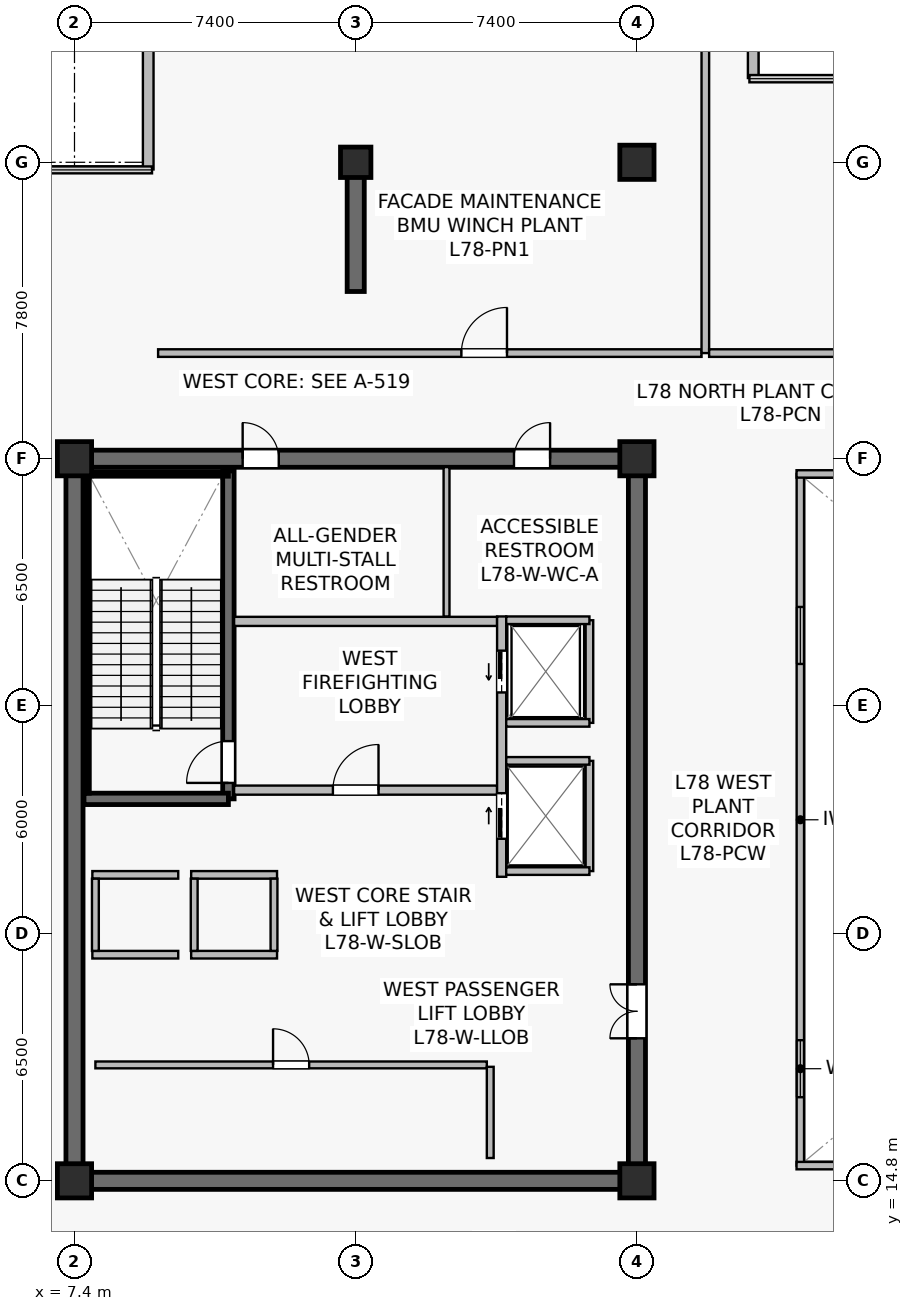
"""IFC4 building model, lengths in metres.
Left out: names, types, materials, properties, quantities, classifications, styles, units other than length and angle.
Written with IfcOpenShell. Run it as: python <this file> out.ifc"""

import sys

from ifc_helpers import new_model, si_unit, direction, frame, frame_2d, origin, origin_2d, place, context, subcontext, project, spatial, rectangle, extrude, source, transform, mapped, element, fill, save


model = new_model("IFC4")
c1 = context("Model", 3, precision=1e-05, world=origin(), true_north=direction((0.0, 1.0)))
c2 = subcontext(c1, "Body", "Model", "MODEL_VIEW")
j1 = project(units=[si_unit("LENGTHUNIT", "METRE"), si_unit("PLANEANGLEUNIT", "RADIAN")], contexts=[c1])
p1 = place(None, origin())
s1 = spatial("IfcSite", under=j1, at=p1, CompositionType="ELEMENT")
p2 = place(p1, origin())
s2 = spatial("IfcBuilding", under=s1, at=p2, CompositionType="ELEMENT")
p3 = place(p2, frame((0.0, 0.0, 327.0)))
s3 = spatial("IfcBuildingStorey", under=s2, at=p3, CompositionType="ELEMENT", Elevation=327.0)
p4 = place(p3, frame((7.175, 14.8, 0.0), z_axis=(0.0, 0.0, 1.0), x_axis=(1.0, 0.0, 0.0)))
e1 = element("IfcWall", 1, at=p4, inside=s3, PredefinedType="SHEAR", context=c2, shape_type="SweptSolid", body=[
    extrude(rectangle(XDim=15.25, YDim=0.45, at=frame_2d((7.625, 0.0))), origin(), (0.0, 0.0, 1.0), 5.12),
])
p5 = place(p3, frame((7.175, 33.8, 0.0), z_axis=(0.0, 0.0, 1.0), x_axis=(1.0, 0.0, 0.0)))
e2 = element("IfcWall", 2, at=p5, inside=s3, PredefinedType="SHEAR", context=c2, shape_type="SweptSolid", body=[
    extrude(rectangle(XDim=15.25, YDim=0.45, at=frame_2d((7.625, 0.0))), origin(), (0.0, 0.0, 1.0), 5.12),
])
p6 = place(p5, frame((4.65, 0.0, 0.0)))
e3 = element("IfcOpeningElement", 3, at=p6, cuts=e2, PredefinedType="OPENING", context=c2, shape_type="SweptSolid", body=[
    extrude(rectangle(XDim=0.95, YDim=2.15, at=frame_2d((0.475, 1.075))), frame((0.0, 0.235, 0.0), z_axis=(0.0, -1.0, 0.0), x_axis=(1.0, 0.0, 0.0)), (0.0, 0.0, 1.0), 0.47),
])
p7 = place(p5, frame((11.79, 0.0, 0.0)))
e4 = element("IfcOpeningElement", 4, at=p7, cuts=e2, PredefinedType="OPENING", context=c2, shape_type="SweptSolid", body=[
    extrude(rectangle(XDim=0.95, YDim=2.15, at=frame_2d((0.475, 1.075))), frame((0.0, 0.235, 0.0), z_axis=(0.0, -1.0, 0.0), x_axis=(1.0, 0.0, 0.0)), (0.0, 0.0, 1.0), 0.47),
])
p8 = place(p3, frame((7.4, 15.025, 0.0), z_axis=(0.0, 0.0, 1.0), x_axis=(0.0, 1.0, 0.0)))
e5 = element("IfcWall", 5, at=p8, inside=s3, PredefinedType="SHEAR", context=c2, shape_type="SweptSolid", body=[
    extrude(rectangle(XDim=18.55, YDim=0.45, at=frame_2d((9.275, 0.0))), origin(), (0.0, 0.0, 1.0), 5.12),
])
p9 = place(p3, frame((22.2, 15.025, 0.0), z_axis=(0.0, 0.0, 1.0), x_axis=(0.0, 1.0, 0.0)))
e6 = element("IfcWall", 6, at=p9, inside=s3, PredefinedType="SHEAR", context=c2, shape_type="SweptSolid", body=[
    extrude(rectangle(XDim=18.55, YDim=0.45, at=frame_2d((9.275, 0.0))), origin(), (0.0, 0.0, 1.0), 5.12),
])
p10 = place(p9, frame((3.525, 0.0, 0.0)))
e7 = element("IfcOpeningElement", 7, at=p10, cuts=e6, PredefinedType="OPENING", context=c2, shape_type="SweptSolid", body=[
    extrude(rectangle(XDim=1.42, YDim=2.2, at=frame_2d((0.71, 1.1))), frame((0.0, 0.235, 0.0), z_axis=(0.0, -1.0, 0.0), x_axis=(1.0, 0.0, 0.0)), (0.0, 0.0, 1.0), 0.47),
])
p11 = place(p3, frame((11.45, 24.85, 0.0), z_axis=(0.0, 0.0, 1.0), x_axis=(0.0, 1.0, 0.0)))
e8 = element("IfcWall", 8, at=p11, inside=s3, PredefinedType="SHEAR", context=c2, shape_type="SweptSolid", body=[
    extrude(rectangle(XDim=8.63, YDim=0.3, at=frame_2d((4.315, 0.0))), origin(), (0.0, 0.0, 1.0), 5.12),
])
p12 = place(p11, frame((0.42, 0.0, 0.0)))
e9 = element("IfcOpeningElement", 9, at=p12, cuts=e8, PredefinedType="OPENING", context=c2, shape_type="SweptSolid", body=[
    extrude(rectangle(XDim=1.1, YDim=2.15, at=frame_2d((0.55, 1.075))), frame((0.0, 0.16, 0.0), z_axis=(0.0, -1.0, 0.0), x_axis=(1.0, 0.0, 0.0)), (0.0, 0.0, 1.0), 0.32),
])
p13 = place(p3, frame((7.65, 24.85, 0.0), z_axis=(0.0, 0.0, 1.0), x_axis=(1.0, 0.0, 0.0)))
e10 = element("IfcWall", 10, at=p13, inside=s3, PredefinedType="SHEAR", context=c2, shape_type="SweptSolid", body=[
    extrude(rectangle(XDim=3.8, YDim=0.3, at=frame_2d((1.9, 0.0))), origin(), (0.0, 0.0, 1.0), 5.12),
])
p14 = place(p3, frame((7.73, 33.4, 0.0), z_axis=(0.0, 0.0, 1.0), x_axis=(1.0, 0.0, 0.0)))
e11 = element("IfcWall", 11, at=p14, inside=s3, PredefinedType="SOLIDWALL", context=c2, shape_type="SweptSolid", body=[
    extrude(rectangle(XDim=3.72, YDim=0.12, at=frame_2d((1.86, 0.0))), origin(), (0.0, 0.0, 1.0), 5.12),
])
p15 = place(p3, frame((7.73, 25.0, 0.0), z_axis=(0.0, 0.0, 1.0), x_axis=(0.0, 1.0, 0.0)))
e12 = element("IfcWall", 12, at=p15, inside=s3, PredefinedType="SOLIDWALL", context=c2, shape_type="SweptSolid", body=[
    extrude(rectangle(XDim=8.32, YDim=0.12, at=frame_2d((4.16, 0.0))), origin(), (0.0, 0.0, 1.0), 5.12),
])
p16 = place(p3, frame((14.8, 38.2, 0.0), z_axis=(0.0, 0.0, 1.0), x_axis=(0.0, 1.0, 0.0)))
e13 = element("IfcWall", 13, at=p16, inside=s3, PredefinedType="SHEAR", context=c2, shape_type="SweptSolid", body=[
    extrude(rectangle(XDim=3.1, YDim=0.45, at=frame_2d((1.55, 0.0))), origin(), (0.0, 0.0, 1.0), 5.12),
])
m1 = source(origin(), c2, "Body", "SweptSolid", [
    extrude(rectangle(XDim=0.9, YDim=0.9, at=origin_2d()), origin(), (0.0, 0.0, 1.0), 5.4),
])
for number, where, z_axis, x_axis in (
    (14, (7.4, 14.8, 0.0), (0.0, 0.0, 1.0), (1.0, 0.0, 0.0)),
    (15, (22.2, 14.8, 0.0), (0.0, 0.0, 1.0), (1.0, 0.0, 0.0)),
    (16, (7.4, 33.8, 0.0), (0.0, 0.0, 1.0), (1.0, 0.0, 0.0)),
    (17, (22.2, 33.8, 0.0), (0.0, 0.0, 1.0), (1.0, 0.0, 0.0)),
):
    element("IfcColumn", number, at=place(p3, frame(where, z_axis=z_axis, x_axis=x_axis)), inside=s3, PredefinedType="COLUMN", context=c2, shape_type="MappedRepresentation", body=[
        mapped(m1, transform((0.0, 0.0, 0.0), scale=1.0)),
    ])
m2 = source(origin(), c2, "Body", "SweptSolid", [
    extrude(rectangle(XDim=0.8, YDim=0.8, at=origin_2d()), origin(), (0.0, 0.0, 1.0), 5.4),
])
p17 = place(p3, frame((14.8, 41.6, 0.0), z_axis=(0.0, 0.0, 1.0), x_axis=(1.0, 0.0, 0.0)))
e18 = element("IfcColumn", 18, at=p17, inside=s3, PredefinedType="COLUMN", context=c2, shape_type="MappedRepresentation", body=[
    mapped(m2, transform((0.0, 0.0, 0.0), scale=1.0)),
])
p18 = place(p3, frame((22.2, 41.6, 0.0), z_axis=(0.0, 0.0, 1.0), x_axis=(1.0, 0.0, 0.0)))
e19 = element("IfcColumn", 19, at=p18, inside=s3, PredefinedType="COLUMN", context=c2, shape_type="MappedRepresentation", body=[
    mapped(m1, transform((0.0, 0.0, 0.0), scale=1.0)),
])
p19 = place(p3, frame((25.26, 43.817, 0.0), z_axis=(0.0, 0.0, 1.0), x_axis=(0.0, 1.0, 0.0)))
e20 = element("IfcWall", 20, at=p19, inside=s3, PredefinedType="STANDARD", context=c2, shape_type="SweptSolid", body=[
    extrude(rectangle(XDim=1.083, YDim=0.28, at=frame_2d((0.542, 0.0))), origin(), (0.0, 0.0, 1.0), 5.12),
])
p20 = place(p3, frame((9.34, 44.9, 0.0), z_axis=(0.0, 0.0, 1.0), x_axis=(0.0, -1.0, 0.0)))
e21 = element("IfcWall", 21, at=p20, inside=s3, PredefinedType="STANDARD", context=c2, shape_type="SweptSolid", body=[
    extrude(rectangle(XDim=3.488, YDim=0.28, at=frame_2d((1.744, 0.0))), origin(), (0.0, 0.0, 1.0), 5.12),
])
p21 = place(p3, frame((11.6, 25.08, 0.0), z_axis=(0.0, 0.0, 1.0), x_axis=(1.0, 0.0, 0.0)))
e22 = element("IfcWall", 22, at=p21, inside=s3, PredefinedType="SOLIDWALL", context=c2, shape_type="SweptSolid", body=[
    extrude(rectangle(XDim=6.92, YDim=0.24, at=frame_2d((3.46, 0.0))), origin(), (0.0, 0.0, 1.0), 4.517),
])
p22 = place(p21, frame((2.6, 0.0, 0.0)))
e23 = element("IfcOpeningElement", 23, at=p22, cuts=e22, PredefinedType="OPENING", context=c2, shape_type="SweptSolid", body=[
    extrude(rectangle(XDim=1.2, YDim=2.16, at=frame_2d((0.6, 1.08))), frame((0.0, 0.13, 0.0), z_axis=(0.0, -1.0, 0.0), x_axis=(1.0, 0.0, 0.0)), (0.0, 0.0, 1.0), 0.26),
])
p23 = place(p3, frame((11.6, 29.52, 0.0), z_axis=(0.0, 0.0, 1.0), x_axis=(1.0, 0.0, 0.0)))
e24 = element("IfcWall", 24, at=p23, inside=s3, PredefinedType="SOLIDWALL", context=c2, shape_type="SweptSolid", body=[
    extrude(rectangle(XDim=6.92, YDim=0.24, at=frame_2d((3.46, 0.0))), origin(), (0.0, 0.0, 1.0), 4.517),
])
p24 = place(p3, frame((18.64, 22.8, 0.0), z_axis=(0.0, 0.0, 1.0), x_axis=(0.0, 1.0, 0.0)))
e25 = element("IfcWall", 25, at=p24, inside=s3, PredefinedType="SOLIDWALL", context=c2, shape_type="SweptSolid", body=[
    extrude(rectangle(XDim=6.85, YDim=0.24, at=frame_2d((3.425, 0.0))), origin(), (0.0, 0.0, 1.0), 4.255),
])
p25 = place(p24, frame((4.85, 0.0, 0.0)))
e26 = element("IfcOpeningElement", 26, at=p25, cuts=e25, PredefinedType="OPENING", context=c2, shape_type="SweptSolid", body=[
    extrude(rectangle(XDim=1.1, YDim=2.22, at=frame_2d((0.55, 1.11))), frame((0.0, 0.13, 0.0), z_axis=(0.0, -1.0, 0.0), x_axis=(1.0, 0.0, 0.0)), (0.0, 0.0, 1.0), 0.26),
])
p26 = place(p24, frame((1.0, 0.0, 0.0)))
e27 = element("IfcOpeningElement", 27, at=p26, cuts=e25, PredefinedType="OPENING", context=c2, shape_type="SweptSolid", body=[
    extrude(rectangle(XDim=1.2, YDim=2.22, at=frame_2d((0.6, 1.11))), frame((0.0, 0.13, 0.0), z_axis=(0.0, -1.0, 0.0), x_axis=(1.0, 0.0, 0.0)), (0.0, 0.0, 1.0), 0.26),
])
for number, where, z_axis, x_axis in (
    (28, (7.87, 20.75, 0.0), (0.0, 0.0, 1.0), (1.0, 0.0, 0.0)),
    (29, (7.87, 22.85, 0.0), (0.0, 0.0, 1.0), (1.0, 0.0, 0.0)),
):
    element("IfcWall", number, at=place(p3, frame(where, z_axis=z_axis, x_axis=x_axis)), inside=s3, PredefinedType="SOLIDWALL", context=c2, shape_type="SweptSolid", body=[
        extrude(rectangle(XDim=2.26, YDim=0.2, at=frame_2d((1.13, 0.0))), origin(), (0.0, 0.0, 1.0), 5.12),
    ])
p27 = place(p3, frame((7.95, 20.85, 0.0), z_axis=(0.0, 0.0, 1.0), x_axis=(0.0, 1.0, 0.0)))
e30 = element("IfcWall", 30, at=p27, inside=s3, PredefinedType="SOLIDWALL", context=c2, shape_type="SweptSolid", body=[
    extrude(rectangle(XDim=1.9, YDim=0.18, at=frame_2d((0.95, 0.0))), origin(), (0.0, 0.0, 1.0), 5.12),
])
for number, where, z_axis, x_axis in (
    (31, (10.47, 20.75, 0.0), (0.0, 0.0, 1.0), (1.0, 0.0, 0.0)),
    (32, (10.47, 22.85, 0.0), (0.0, 0.0, 1.0), (1.0, 0.0, 0.0)),
):
    element("IfcWall", number, at=place(p3, frame(where, z_axis=z_axis, x_axis=x_axis)), inside=s3, PredefinedType="SOLIDWALL", context=c2, shape_type="SweptSolid", body=[
        extrude(rectangle(XDim=2.26, YDim=0.2, at=frame_2d((1.13, 0.0))), origin(), (0.0, 0.0, 1.0), 5.12),
    ])
for number, where, z_axis, x_axis in (
    (33, (10.55, 20.85, 0.0), (0.0, 0.0, 1.0), (0.0, 1.0, 0.0)),
    (34, (12.65, 20.85, 0.0), (0.0, 0.0, 1.0), (0.0, 1.0, 0.0)),
):
    element("IfcWall", number, at=place(p3, frame(where, z_axis=z_axis, x_axis=x_axis)), inside=s3, PredefinedType="SOLIDWALL", context=c2, shape_type="SweptSolid", body=[
        extrude(rectangle(XDim=1.9, YDim=0.18, at=frame_2d((0.95, 0.0))), origin(), (0.0, 0.0, 1.0), 5.12),
    ])
p28 = place(p3, frame((20.95, 26.85, 0.0), z_axis=(0.0, 0.0, 1.0), x_axis=(0.0, 1.0, 0.0)))
e35 = element("IfcWall", 35, at=p28, inside=s3, PredefinedType="SOLIDWALL", context=c2, shape_type="SweptSolid", body=[
    extrude(rectangle(XDim=2.7, YDim=0.2, at=frame_2d((1.35, 0.0))), origin(), (0.0, 0.0, 1.0), 5.12),
])
p29 = place(p3, frame((18.76, 29.55, 0.0), z_axis=(0.0, 0.0, 1.0), x_axis=(1.0, 0.0, 0.0)))
e36 = element("IfcWall", 36, at=p29, inside=s3, PredefinedType="SOLIDWALL", context=c2, shape_type="SweptSolid", body=[
    extrude(rectangle(XDim=2.19, YDim=0.2, at=frame_2d((1.095, 0.0))), origin(), (0.0, 0.0, 1.0), 5.12),
])
p30 = place(p3, frame((18.76, 26.85, 0.0), z_axis=(0.0, 0.0, 1.0), x_axis=(1.0, 0.0, 0.0)))
e37 = element("IfcWall", 37, at=p30, inside=s3, PredefinedType="SOLIDWALL", context=c2, shape_type="SweptSolid", body=[
    extrude(rectangle(XDim=2.19, YDim=0.2, at=frame_2d((1.095, 0.0))), origin(), (0.0, 0.0, 1.0), 4.517),
])
p31 = place(p3, frame((20.95, 22.95, 0.0), z_axis=(0.0, 0.0, 1.0), x_axis=(0.0, 1.0, 0.0)))
e38 = element("IfcWall", 38, at=p31, inside=s3, PredefinedType="SOLIDWALL", context=c2, shape_type="SweptSolid", body=[
    extrude(rectangle(XDim=2.9, YDim=0.2, at=frame_2d((1.45, 0.0))), origin(), (0.0, 0.0, 1.0), 4.255),
])
for number, where, z_axis, x_axis in (
    (39, (18.76, 25.85, 0.0), (0.0, 0.0, 1.0), (1.0, 0.0, 0.0)),
    (40, (18.76, 22.95, 0.0), (0.0, 0.0, 1.0), (1.0, 0.0, 0.0)),
):
    element("IfcWall", number, at=place(p3, frame(where, z_axis=z_axis, x_axis=x_axis)), inside=s3, PredefinedType="SOLIDWALL", context=c2, shape_type="SweptSolid", body=[
        extrude(rectangle(XDim=2.19, YDim=0.2, at=frame_2d((1.095, 0.0))), origin(), (0.0, 0.0, 1.0), 5.12),
    ])
p32 = place(p3, frame((7.95, 17.85, 0.0), z_axis=(0.0, 0.0, 1.0), x_axis=(1.0, 0.0, 0.0)))
e41 = element("IfcWall", 41, at=p32, inside=s3, PredefinedType="SOLIDWALL", context=c2, shape_type="SweptSolid", body=[
    extrude(rectangle(XDim=10.3, YDim=0.18, at=frame_2d((5.15, 0.0))), origin(), (0.0, 0.0, 1.0), 4.517),
])
p33 = place(p32, frame((4.675, 0.0, 0.0)))
e42 = element("IfcOpeningElement", 42, at=p33, cuts=e41, PredefinedType="OPENING", context=c2, shape_type="SweptSolid", body=[
    extrude(rectangle(XDim=0.95, YDim=2.15, at=frame_2d((0.475, 1.075))), frame((0.0, 0.1, 0.0), z_axis=(0.0, -1.0, 0.0), x_axis=(1.0, 0.0, 0.0)), (0.0, 0.0, 1.0), 0.2),
])
p34 = place(p3, frame((18.34, 15.4, 0.0), z_axis=(0.0, 0.0, 1.0), x_axis=(0.0, 1.0, 0.0)))
e43 = element("IfcWall", 43, at=p34, inside=s3, PredefinedType="SOLIDWALL", context=c2, shape_type="SweptSolid", body=[
    extrude(rectangle(XDim=2.4, YDim=0.18, at=frame_2d((1.2, 0.0))), origin(), (0.0, 0.0, 1.0), 5.12),
])
p35 = place(p3, frame((17.19, 29.65, 0.0), z_axis=(0.0, 0.0, 1.0), x_axis=(0.0, 1.0, 0.0)))
e44 = element("IfcWall", 44, at=p35, inside=s3, PredefinedType="PLUMBINGWALL", context=c2, shape_type="SweptSolid", body=[
    extrude(rectangle(XDim=3.93, YDim=0.155, at=frame_2d((1.965, 0.0))), origin(), (0.0, 0.0, 1.0), 5.12),
])
p36 = place(p3, frame((26.5, 15.2, 0.0), z_axis=(0.0, 0.0, 1.0), x_axis=(0.0, 1.0, 0.0)))
e45 = element("IfcWall", 45, at=p36, inside=s3, PredefinedType="SOLIDWALL", context=c2, shape_type="SweptSolid", body=[
    extrude(rectangle(XDim=18.2, YDim=0.195, at=frame_2d((9.1, 0.0))), origin(), (0.0, 0.0, 1.0), 5.12),
])
p37 = place(p36, frame((1.8, 0.0, 0.9)))
e46 = element("IfcOpeningElement", 46, at=p37, cuts=e45, PredefinedType="OPENING", context=c2, shape_type="SweptSolid", body=[
    extrude(rectangle(XDim=1.5, YDim=1.4, at=frame_2d((0.75, 0.7))), frame((0.0, 0.107, 0.0), z_axis=(0.0, -1.0, 0.0), x_axis=(1.0, 0.0, 0.0)), (0.0, 0.0, 1.0), 0.215),
])
p38 = place(p36, frame((13.2, 0.0, 0.9)))
e47 = element("IfcOpeningElement", 47, at=p38, cuts=e45, PredefinedType="OPENING", context=c2, shape_type="SweptSolid", body=[
    extrude(rectangle(XDim=1.5, YDim=1.4, at=frame_2d((0.75, 0.7))), frame((0.0, 0.107, 0.0), z_axis=(0.0, -1.0, 0.0), x_axis=(1.0, 0.0, 0.0)), (0.0, 0.0, 1.0), 0.215),
])
for number, where, z_axis, x_axis in (
    (48, (26.4, 15.2, 0.0), (0.0, 0.0, 1.0), (1.0, 0.0, 0.0)),
    (49, (26.4, 33.4, 0.0), (0.0, 0.0, 1.0), (1.0, 0.0, 0.0)),
):
    element("IfcWall", number, at=place(p3, frame(where, z_axis=z_axis, x_axis=x_axis)), inside=s3, PredefinedType="SOLIDWALL", context=c2, shape_type="SweptSolid", body=[
        extrude(rectangle(XDim=22.0, YDim=0.195, at=frame_2d((11.0, 0.0))), origin(), (0.0, 0.0, 1.0), 5.12),
    ])
p39 = place(p3, frame((9.6, 36.58, 0.0), z_axis=(0.0, 0.0, 1.0), x_axis=(1.0, 0.0, 0.0)))
e50 = element("IfcWall", 50, at=p39, inside=s3, PredefinedType="SOLIDWALL", context=c2, shape_type="SweptSolid", body=[
    extrude(rectangle(XDim=14.3, YDim=0.2, at=frame_2d((7.15, 0.0))), origin(), (0.0, 0.0, 1.0), 4.517),
])
p40 = place(p39, frame((7.981, 0.0, 0.0)))
e51 = element("IfcOpeningElement", 51, at=p40, cuts=e50, PredefinedType="OPENING", context=c2, shape_type="SweptSolid", body=[
    extrude(rectangle(XDim=1.2, YDim=2.16, at=frame_2d((0.6, 1.08))), frame((0.0, 0.11, 0.0), z_axis=(0.0, -1.0, 0.0), x_axis=(1.0, 0.0, 0.0)), (0.0, 0.0, 1.0), 0.22),
])
p41 = place(p3, frame((24.0, 36.58, 0.0), z_axis=(0.0, 0.0, 1.0), x_axis=(0.0, 1.0, 0.0)))
e52 = element("IfcWall", 52, at=p41, inside=s3, PredefinedType="SOLIDWALL", context=c2, shape_type="SweptSolid", body=[
    extrude(rectangle(XDim=8.21, YDim=0.2, at=frame_2d((4.105, 0.0))), origin(), (0.0, 0.0, 1.0), 4.455),
])
p42 = place(p3, frame((24.1, 36.58, 0.0), z_axis=(0.0, 0.0, 1.0), x_axis=(1.0, 0.0, 0.0)))
e53 = element("IfcWall", 53, at=p42, inside=s3, PredefinedType="SOLIDWALL", context=c2, shape_type="SweptSolid", body=[
    extrude(rectangle(XDim=26.6, YDim=0.2, at=frame_2d((13.3, 0.0))), origin(), (0.0, 0.0, 1.0), 4.517),
])
p43 = place(p42, frame((12.7, 0.0, 0.0)))
e54 = element("IfcOpeningElement", 54, at=p43, cuts=e53, PredefinedType="OPENING", context=c2, shape_type="SweptSolid", body=[
    extrude(rectangle(XDim=1.2, YDim=2.16, at=frame_2d((0.6, 1.08))), frame((0.0, 0.11, 0.0), z_axis=(0.0, -1.0, 0.0), x_axis=(1.0, 0.0, 0.0)), (0.0, 0.0, 1.0), 0.22),
])
m3 = source(origin(), c2, "Body", "SweptSolid", [
    extrude(rectangle(XDim=1.5, YDim=1.4, at=frame_2d((0.75, 0.7))), frame((0.0, 0.03, 0.0), z_axis=(0.0, -1.0, 0.0), x_axis=(1.0, 0.0, 0.0)), (0.0, 0.0, 1.0), 0.06),
])
p44 = place(p37, origin())
e55 = element("IfcWindow", 55, at=p44, inside=s3, PartitioningType="SINGLE_PANEL", PredefinedType="WINDOW", context=c2, shape_type="MappedRepresentation", body=[
    mapped(m3, transform((0.0, 0.0, 0.0), scale=1.0)),
])
fill(e46, e55)
p45 = place(p38, origin())
e56 = element("IfcWindow", 56, at=p45, inside=s3, PartitioningType="SINGLE_PANEL", PredefinedType="WINDOW", context=c2, shape_type="MappedRepresentation", body=[
    mapped(m3, transform((0.0, 0.0, 0.0), scale=1.0)),
])
fill(e47, e56)
m4 = source(origin(), c2, "Body", "SweptSolid", [
    extrude(rectangle(XDim=1.1, YDim=2.15, at=frame_2d((0.55, 1.075))), frame((0.0, 0.025, 0.0), z_axis=(0.0, -1.0, 0.0), x_axis=(1.0, 0.0, 0.0)), (0.0, 0.0, 1.0), 0.05),
])
p46 = place(p12, origin())
e57 = element("IfcDoor", 57, at=p46, inside=s3, OperationType="SINGLE_SWING_LEFT", PredefinedType="DOOR", context=c2, shape_type="MappedRepresentation", body=[
    mapped(m4, transform((0.0, 0.0, 0.0), scale=1.0)),
])
fill(e9, e57)
m5 = source(origin(), c2, "Body", "SweptSolid", [
    extrude(rectangle(XDim=1.2, YDim=2.16, at=frame_2d((0.6, 1.08))), frame((0.0, 0.025, 0.0), z_axis=(0.0, -1.0, 0.0), x_axis=(1.0, 0.0, 0.0)), (0.0, 0.0, 1.0), 0.05),
])
p47 = place(p22, origin())
e58 = element("IfcDoor", 58, at=p47, inside=s3, OperationType="SINGLE_SWING_RIGHT", PredefinedType="DOOR", context=c2, shape_type="MappedRepresentation", body=[
    mapped(m5, transform((0.0, 0.0, 0.0), scale=1.0)),
])
fill(e23, e58)
m6 = source(origin(), c2, "Body", "SweptSolid", [
    extrude(rectangle(XDim=1.1, YDim=2.22, at=frame_2d((0.55, 1.11))), frame((0.0, 0.025, 0.0), z_axis=(0.0, -1.0, 0.0), x_axis=(1.0, 0.0, 0.0)), (0.0, 0.0, 1.0), 0.05),
])
p48 = place(p25, origin())
e59 = element("IfcDoor", 59, at=p48, inside=s3, OperationType="SLIDING_TO_LEFT", PredefinedType="USERDEFINED", context=c2, shape_type="MappedRepresentation", body=[
    mapped(m6, transform((0.0, 0.0, 0.0), scale=1.0)),
])
fill(e26, e59)
m7 = source(origin(), c2, "Body", "SweptSolid", [
    extrude(rectangle(XDim=1.2, YDim=2.22, at=frame_2d((0.6, 1.11))), frame((0.0, 0.025, 0.0), z_axis=(0.0, -1.0, 0.0), x_axis=(1.0, 0.0, 0.0)), (0.0, 0.0, 1.0), 0.05),
])
p49 = place(p26, origin())
e60 = element("IfcDoor", 60, at=p49, inside=s3, OperationType="SLIDING_TO_RIGHT", PredefinedType="USERDEFINED", context=c2, shape_type="MappedRepresentation", body=[
    mapped(m7, transform((0.0, 0.0, 0.0), scale=1.0)),
])
fill(e27, e60)
m8 = source(origin(), c2, "Body", "SweptSolid", [
    extrude(rectangle(XDim=0.95, YDim=2.15, at=frame_2d((0.475, 1.075))), frame((0.0, 0.025, 0.0), z_axis=(0.0, -1.0, 0.0), x_axis=(1.0, 0.0, 0.0)), (0.0, 0.0, 1.0), 0.05),
])
p50 = place(p33, origin())
e61 = element("IfcDoor", 61, at=p50, inside=s3, OperationType="SINGLE_SWING_LEFT", PredefinedType="DOOR", context=c2, shape_type="MappedRepresentation", body=[
    mapped(m8, transform((0.0, 0.0, 0.0), scale=1.0)),
])
fill(e42, e61)
m9 = source(origin(), c2, "Body", "SweptSolid", [
    extrude(rectangle(XDim=1.42, YDim=2.2, at=frame_2d((0.71, 1.1))), frame((0.0, 0.025, 0.0), z_axis=(0.0, -1.0, 0.0), x_axis=(1.0, 0.0, 0.0)), (0.0, 0.0, 1.0), 0.05),
])
p51 = place(p10, origin())
e62 = element("IfcDoor", 62, at=p51, inside=s3, OperationType="DOUBLE_DOOR_SINGLE_SWING", PredefinedType="DOOR", context=c2, shape_type="MappedRepresentation", body=[
    mapped(m9, transform((0.0, 0.0, 0.0), scale=1.0)),
])
fill(e7, e62)
p52 = place(p6, origin())
e63 = element("IfcDoor", 63, at=p52, inside=s3, OperationType="SINGLE_SWING_LEFT", PredefinedType="DOOR", context=c2, shape_type="MappedRepresentation", body=[
    mapped(m8, transform((0.0, 0.0, 0.0), scale=1.0)),
])
fill(e3, e63)
p53 = place(p7, origin())
e64 = element("IfcDoor", 64, at=p53, inside=s3, OperationType="SINGLE_SWING_RIGHT", PredefinedType="DOOR", context=c2, shape_type="MappedRepresentation", body=[
    mapped(m8, transform((0.0, 0.0, 0.0), scale=1.0)),
])
fill(e4, e64)
p54 = place(p40, origin())
e65 = element("IfcDoor", 65, at=p54, inside=s3, OperationType="SINGLE_SWING_RIGHT", PredefinedType="DOOR", context=c2, shape_type="MappedRepresentation", body=[
    mapped(m5, transform((0.0, 0.0, 0.0), scale=1.0)),
])
fill(e51, e65)
save(model, sys.argv[1])
